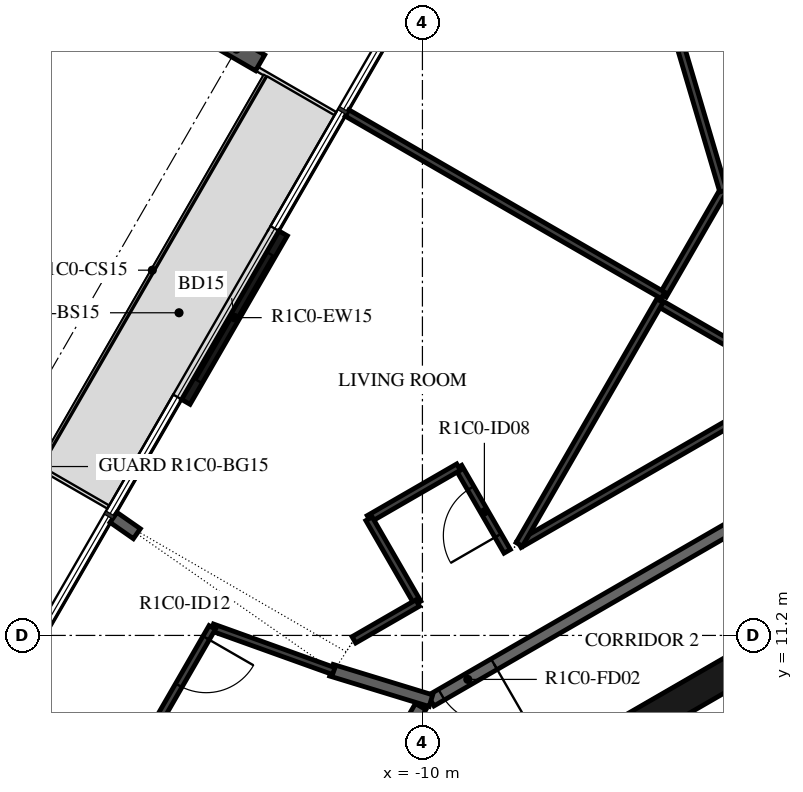
"""IFC4 building model, lengths in metres.
Left out: names, types, materials, properties, quantities, classifications, styles, units other than length and angle.
Written with IfcOpenShell. Run it as: python <this file> out.ifc"""

import sys

from ifc_helpers import new_model, si_unit, direction, frame, frame_2d, origin, origin_2d, place, context, subcontext, project, spatial, rectangle, i_section, extrude, element, fill, save


model = new_model("IFC4")
c1 = context("Model", 3, precision=1e-05, world=origin(), true_north=direction((0.0, 1.0)))
c2 = subcontext(c1, "Body", "Model", "MODEL_VIEW")
j1 = project(units=[si_unit("LENGTHUNIT", "METRE"), si_unit("PLANEANGLEUNIT", "RADIAN")], contexts=[c1])
p1 = place(None, origin())
s1 = spatial("IfcSite", under=j1, at=p1, CompositionType="ELEMENT")
p2 = place(p1, origin())
s2 = spatial("IfcBuilding", under=s1, at=p2, CompositionType="ELEMENT")
p3 = place(p2, frame((0.0, 0.0, 66.4)))
s3 = spatial("IfcBuildingStorey", under=s2, at=p3, CompositionType="ELEMENT", Elevation=66.4)
p4 = place(p3, frame((-13.059, 20.842, -0.38), z_axis=(0.0, 0.0, 1.0), x_axis=(0.50000017485, 0.866025302835, 0.0)))
e1 = element("IfcColumn", 1, at=p4, inside=s3, PredefinedType="COLUMN", context=c2, shape_type="SweptSolid", body=[
    extrude(i_section(OverallWidth=0.3, OverallDepth=0.9, WebThickness=0.019, FlangeThickness=0.035, FilletRadius=0.03, at=origin_2d()), origin(), (0.0, 0.0, 1.0), 2.616),
])
p5 = place(p3, frame((-12.291, 17.812, 0.0), z_axis=(0.0, 0.0, 1.0), x_axis=(-0.499971222258, -0.866042017984, 0.0)))
e2 = element("IfcWall", 2, at=p5, inside=s3, PredefinedType="STANDARD", context=c2, shape_type="SweptSolid", body=[
    extrude(rectangle(XDim=3.2, YDim=0.16, at=frame_2d((1.6, 0.0))), origin(), (0.0, 0.0, 1.0), 3.05),
])
p6 = place(p5, frame((0.4, 0.0, 0.0)))
e3 = element("IfcOpeningElement", 3, at=p6, cuts=e2, PredefinedType="OPENING", context=c2, shape_type="SweptSolid", body=[
    extrude(rectangle(XDim=2.4, YDim=2.4, at=frame_2d((1.2, 1.2))), frame((0.0, 0.09, 0.0), z_axis=(0.0, -1.0, 0.0), x_axis=(1.0, 0.0, 0.0)), (0.0, 0.0, 1.0), 0.18),
])
p7 = place(p3, frame((-4.51, 10.845, 0.0), z_axis=(0.0, 0.0, 1.0), x_axis=(-0.865975092491, -0.500087131594, 0.0)))
e4 = element("IfcWall", 4, at=p7, inside=s3, PredefinedType="SHEAR", context=c2, shape_type="SweptSolid", body=[
    extrude(rectangle(XDim=3.033, YDim=0.5, at=frame_2d((1.516, 0.0))), origin(), (0.0, 0.0, 1.0), 3.05),
])
p8 = place(p3, frame((-3.671, 13.7, 0.0), z_axis=(0.0, 0.0, 1.0), x_axis=(-0.866031419417, -0.499989580474, 0.0)))
e5 = element("IfcWall", 5, at=p8, inside=s3, PredefinedType="STANDARD", context=c2, shape_type="SweptSolid", body=[
    extrude(rectangle(XDim=7.147, YDim=0.2, at=frame_2d((3.573, 0.0))), origin(), (0.0, 0.0, 1.0), 3.05),
])
p9 = place(p8, frame((5.947, 0.0, 0.0)))
e6 = element("IfcOpeningElement", 6, at=p9, cuts=e5, PredefinedType="OPENING", context=c2, shape_type="SweptSolid", body=[
    extrude(rectangle(XDim=1.0, YDim=2.1, at=frame_2d((0.5, 1.05))), frame((0.0, 0.11, 0.0), z_axis=(0.0, -1.0, 0.0), x_axis=(1.0, 0.0, 0.0)), (0.0, 0.0, 1.0), 0.22),
])
p10 = place(p3, frame((-10.029, 10.029, 0.0), z_axis=(0.0, 0.0, 1.0), x_axis=(-0.500001669485, -0.866024439905, 0.0)))
e7 = element("IfcWall", 7, at=p10, inside=s3, PredefinedType="STANDARD", context=c2, shape_type="SweptSolid", body=[
    extrude(rectangle(XDim=7.342, YDim=0.2, at=frame_2d((3.671, 0.0))), origin(), (0.0, 0.0, 1.0), 3.05),
])
p11 = place(p10, frame((0.2, 0.0, 0.0)))
e8 = element("IfcOpeningElement", 8, at=p11, cuts=e7, PredefinedType="OPENING", context=c2, shape_type="SweptSolid", body=[
    extrude(rectangle(XDim=1.0, YDim=2.1, at=frame_2d((0.5, 1.05))), frame((0.0, 0.11, 0.0), z_axis=(0.0, -1.0, 0.0), x_axis=(1.0, 0.0, 0.0)), (0.0, 0.0, 1.0), 0.22),
])
p12 = place(p3, frame((-11.496, 10.627, 0.0), z_axis=(0.0, 0.0, 1.0), x_axis=(0.956240708563, -0.292581112321, 0.0)))
e9 = element("IfcWall", 9, at=p12, inside=s3, PredefinedType="STANDARD", context=c2, shape_type="SweptSolid", body=[
    extrude(rectangle(XDim=1.711, YDim=0.2, at=frame_2d((0.855, 0.0))), origin(), (0.0, 0.0, 1.0), 3.05),
])
p13 = place(p3, frame((-15.08, 13.14, 0.0), z_axis=(0.0, 0.0, 1.0), x_axis=(0.820309143391, -0.571920369692, 0.0)))
e10 = element("IfcWall", 10, at=p13, inside=s3, PredefinedType="STANDARD", context=c2, shape_type="SweptSolid", body=[
    extrude(rectangle(XDim=0.468, YDim=0.2, at=frame_2d((0.234, 0.0))), origin(), (0.0, 0.0, 1.0), 3.05),
])
p14 = place(p3, frame((-4.073, 15.2, 0.0), z_axis=(0.0, 0.0, 1.0), x_axis=(-0.866034514313, -0.499984219769, 0.0)))
e11 = element("IfcWall", 11, at=p14, inside=s3, PredefinedType="PARTITIONING", context=c2, shape_type="SweptSolid", body=[
    extrude(rectangle(XDim=5.006, YDim=0.12, at=frame_2d((2.503, 0.0))), origin(), (0.0, 0.0, 1.0), 3.05),
])
p15 = place(p14, frame((0.2, 0.0, 0.0)))
e12 = element("IfcOpeningElement", 12, at=p15, cuts=e11, PredefinedType="OPENING", context=c2, shape_type="SweptSolid", body=[
    extrude(rectangle(XDim=0.8, YDim=2.1, at=frame_2d((0.4, 1.05))), frame((0.0, 0.07, 0.0), z_axis=(0.0, -1.0, 0.0), x_axis=(1.0, 0.0, 0.0)), (0.0, 0.0, 1.0), 0.14),
])
p16 = place(p3, frame((-8.606, 12.583, 0.0), z_axis=(0.0, 0.0, 1.0), x_axis=(-0.499995408039, 0.866028054938, 0.0)))
e13 = element("IfcWall", 13, at=p16, inside=s3, PredefinedType="PARTITIONING", context=c2, shape_type="SweptSolid", body=[
    extrude(rectangle(XDim=1.6, YDim=0.12, at=frame_2d((0.8, 0.0))), origin(), (0.0, 0.0, 1.0), 3.05),
])
p17 = place(p16, frame((0.3, 0.0, 0.0)))
e14 = element("IfcOpeningElement", 14, at=p17, cuts=e13, PredefinedType="OPENING", context=c2, shape_type="SweptSolid", body=[
    extrude(rectangle(XDim=0.9, YDim=2.1, at=frame_2d((0.45, 1.05))), frame((0.0, 0.07, 0.0), z_axis=(0.0, -1.0, 0.0), x_axis=(1.0, 0.0, 0.0)), (0.0, 0.0, 1.0), 0.14),
])
p18 = place(p3, frame((-9.406, 13.969, 0.0), z_axis=(0.0, 0.0, 1.0), x_axis=(-0.865989465428, -0.500062241894, 0.0)))
e15 = element("IfcWall", 15, at=p18, inside=s3, PredefinedType="PARTITIONING", context=c2, shape_type="SweptSolid", body=[
    extrude(rectangle(XDim=1.7, YDim=0.12, at=frame_2d((0.85, 0.0))), origin(), (0.0, 0.0, 1.0), 3.05),
])
p19 = place(p3, frame((-10.878, 13.118, 0.0), z_axis=(0.0, 0.0, 1.0), x_axis=(0.500061482766, -0.865989903783, 0.0)))
e16 = element("IfcWall", 16, at=p19, inside=s3, PredefinedType="PARTITIONING", context=c2, shape_type="SweptSolid", body=[
    extrude(rectangle(XDim=1.6, YDim=0.12, at=frame_2d((0.8, 0.0))), origin(), (0.0, 0.0, 1.0), 3.05),
])
p20 = place(p3, frame((-10.078, 11.733, 0.0), z_axis=(0.0, 0.0, 1.0), x_axis=(-0.866014416983, -0.500019029215, 0.0)))
e17 = element("IfcWall", 17, at=p20, inside=s3, PredefinedType="PARTITIONING", context=c2, shape_type="SweptSolid", body=[
    extrude(rectangle(XDim=1.211, YDim=0.12, at=frame_2d((0.606, 0.0))), origin(), (0.0, 0.0, 1.0), 3.05),
])
p21 = place(p3, frame((-1.907, 23.957, 0.0), z_axis=(0.0, 0.0, 1.0), x_axis=(-0.499994901178, -0.866028347571, 0.0)))
e18 = element("IfcWall", 18, at=p21, inside=s3, PredefinedType="PARTITIONING", context=c2, shape_type="SweptSolid", body=[
    extrude(rectangle(XDim=8.274, YDim=0.12, at=frame_2d((4.137, 0.0))), origin(), (0.0, 0.0, 1.0), 3.05),
])
p22 = place(p21, frame((4.387, 0.0, 0.0)))
e19 = element("IfcOpeningElement", 19, at=p22, cuts=e18, PredefinedType="OPENING", context=c2, shape_type="SweptSolid", body=[
    extrude(rectangle(XDim=0.9, YDim=2.1, at=frame_2d((0.45, 1.05))), frame((0.0, 0.07, 0.0), z_axis=(0.0, -1.0, 0.0), x_axis=(1.0, 0.0, 0.0)), (0.0, 0.0, 1.0), 0.14),
])
p23 = place(p3, frame((-6.114, 16.67, 0.0), z_axis=(0.0, 0.0, 1.0), x_axis=(0.866011328839, -0.500024377727, 0.0)))
e20 = element("IfcWall", 20, at=p23, inside=s3, PredefinedType="PARTITIONING", context=c2, shape_type="SweptSolid", body=[
    extrude(rectangle(XDim=2.94, YDim=0.12, at=frame_2d((1.47, 0.0))), origin(), (0.0, 0.0, 1.0), 3.05),
])
p24 = place(p3, frame((-7.4, 26.443, 0.0), z_axis=(0.0, 0.0, 1.0), x_axis=(0.283777867447, -0.95889004685, 0.0)))
e21 = element("IfcWall", 21, at=p24, inside=s3, PredefinedType="PARTITIONING", context=c2, shape_type="SweptSolid", body=[
    extrude(rectangle(XDim=8.274, YDim=0.12, at=frame_2d((4.137, 0.0))), origin(), (0.0, 0.0, 1.0), 3.05),
])
p25 = place(p24, frame((0.8, 0.0, 0.0)))
e22 = element("IfcOpeningElement", 22, at=p25, cuts=e21, PredefinedType="OPENING", context=c2, shape_type="SweptSolid", body=[
    extrude(rectangle(XDim=0.9, YDim=2.1, at=frame_2d((0.45, 1.05))), frame((0.0, 0.07, 0.0), z_axis=(0.0, -1.0, 0.0), x_axis=(1.0, 0.0, 0.0)), (0.0, 0.0, 1.0), 0.14),
])
p26 = place(p3, frame((-11.24, 19.792, 0.0), z_axis=(0.0, 0.0, 1.0), x_axis=(0.866031096941, -0.499990139034, 0.0)))
e23 = element("IfcWall", 23, at=p26, inside=s3, PredefinedType="PARTITIONING", context=c2, shape_type="SweptSolid", body=[
    extrude(rectangle(XDim=6.0, YDim=0.12, at=frame_2d((3.0, 0.0))), origin(), (0.0, 0.0, 1.0), 3.05),
])
p27 = place(p3, frame((-6.094, 16.705, 0.0), z_axis=(0.0, 0.0, 1.0), x_axis=(-0.500014747178, -0.86601688933, 0.0)))
e24 = element("IfcWall", 24, at=p27, inside=s3, PredefinedType="PARTITIONING", context=c2, shape_type="SweptSolid", body=[
    extrude(rectangle(XDim=4.627, YDim=0.12, at=frame_2d((2.313, 0.0))), origin(), (0.0, 0.0, 1.0), 3.05),
])
p28 = place(p3, frame((-11.458, 10.614, 0.0), z_axis=(0.0, 0.0, 1.0), x_axis=(-0.941092440198, 0.338149403375, 0.0)))
e25 = element("IfcWall", 25, at=p28, inside=s3, PredefinedType="PARTITIONING", context=c2, shape_type="SweptSolid", body=[
    extrude(rectangle(XDim=2.123, YDim=0.12, at=frame_2d((1.062, 0.0))), origin(), (0.0, 0.0, 1.0), 3.05),
])
p29 = place(p3, frame((-13.457, 11.332, 0.0), z_axis=(0.0, 0.0, 1.0), x_axis=(-0.499974350878, -0.866040211805, 0.0)))
e26 = element("IfcWall", 26, at=p29, inside=s3, PredefinedType="PARTITIONING", context=c2, shape_type="SweptSolid", body=[
    extrude(rectangle(XDim=3.3, YDim=0.12, at=frame_2d((1.65, 0.0))), origin(), (0.0, 0.0, 1.0), 3.05),
])
p30 = place(p29, frame((0.2, 0.0, 0.0)))
e27 = element("IfcOpeningElement", 27, at=p30, cuts=e26, PredefinedType="OPENING", context=c2, shape_type="SweptSolid", body=[
    extrude(rectangle(XDim=0.9, YDim=2.1, at=frame_2d((0.45, 1.05))), frame((0.0, 0.07, 0.0), z_axis=(0.0, -1.0, 0.0), x_axis=(1.0, 0.0, 0.0)), (0.0, 0.0, 1.0), 0.14),
])
p31 = place(p6, origin())
e28 = element("IfcDoor", 28, at=p31, inside=s3, OperationType="DOUBLE_DOOR_SLIDING", PredefinedType="DOOR", context=c2, shape_type="SweptSolid", body=[
    extrude(rectangle(XDim=2.4, YDim=2.4, at=frame_2d((1.2, 1.2))), frame((0.0, 0.025, 0.0), z_axis=(0.0, -1.0, 0.0), x_axis=(1.0, 0.0, 0.0)), (0.0, 0.0, 1.0), 0.05),
])
fill(e3, e28)
p32 = place(p9, origin())
e29 = element("IfcDoor", 29, at=p32, inside=s3, OperationType="SINGLE_SWING_LEFT", PredefinedType="DOOR", context=c2, shape_type="SweptSolid", body=[
    extrude(rectangle(XDim=1.0, YDim=2.1, at=frame_2d((0.5, 1.05))), frame((0.0, 0.025, 0.0), z_axis=(0.0, -1.0, 0.0), x_axis=(1.0, 0.0, 0.0)), (0.0, 0.0, 1.0), 0.05),
])
fill(e6, e29)
p33 = place(p17, origin())
e30 = element("IfcDoor", 30, at=p33, inside=s3, OperationType="SINGLE_SWING_RIGHT", PredefinedType="DOOR", context=c2, shape_type="SweptSolid", body=[
    extrude(rectangle(XDim=0.9, YDim=2.1, at=frame_2d((0.45, 1.05))), frame((0.0, 0.025, 0.0), z_axis=(0.0, -1.0, 0.0), x_axis=(1.0, 0.0, 0.0)), (0.0, 0.0, 1.0), 0.05),
])
fill(e14, e30)
p34 = place(p30, origin())
e31 = element("IfcDoor", 31, at=p34, inside=s3, OperationType="SINGLE_SWING_LEFT", PredefinedType="DOOR", context=c2, shape_type="SweptSolid", body=[
    extrude(rectangle(XDim=0.9, YDim=2.1, at=frame_2d((0.45, 1.05))), frame((0.0, 0.025, 0.0), z_axis=(0.0, -1.0, 0.0), x_axis=(1.0, 0.0, 0.0)), (0.0, 0.0, 1.0), 0.05),
])
fill(e27, e31)
save(model, sys.argv[1])
